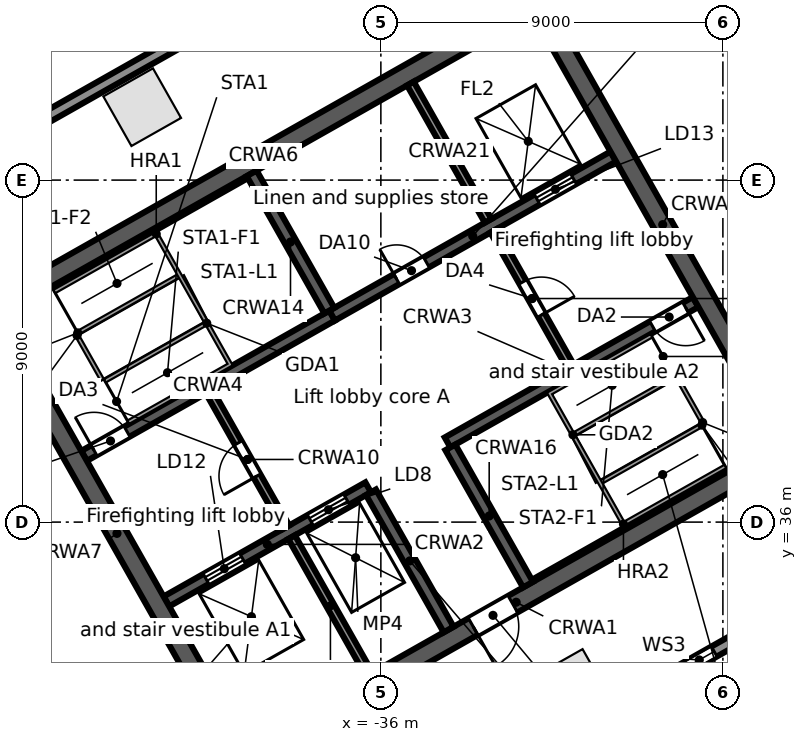
"""IFC4 building model, lengths in metres.
Left out: names, types, materials, properties, quantities, classifications, styles, units other than length and angle.
Written with IfcOpenShell. Run it as: python <this file> out.ifc"""

import sys

from ifc_helpers import new_model, si_unit, direction, frame, frame_2d, origin, origin_2d, place, context, subcontext, project, spatial, rectangle, extrude, element, fill, save


model = new_model("IFC4")
c1 = context("Model", 3, precision=1e-05, world=origin(), true_north=direction((0.0, 1.0)))
c2 = subcontext(c1, "Body", "Model", "MODEL_VIEW")
j1 = project(units=[si_unit("LENGTHUNIT", "METRE"), si_unit("PLANEANGLEUNIT", "RADIAN")], contexts=[c1])
p1 = place(None, origin())
s1 = spatial("IfcSite", under=j1, at=p1, CompositionType="ELEMENT")
p2 = place(p1, origin())
s2 = spatial("IfcBuilding", under=s1, at=p2, CompositionType="ELEMENT")
p3 = place(p2, frame((0.0, 0.0, 190.9)))
s3 = spatial("IfcBuildingStorey", under=s2, at=p3, CompositionType="ELEMENT", Elevation=190.9)
for number, where, z_axis, x_axis in (
    (1, (-42.28, 46.919, 0.0), (0.0, 0.0, 1.0), (-0.87, -0.492, 0.0)),
    (2, (-30.976, 31.635, 0.0), (0.0, 0.0, 1.0), (0.87, 0.492, 0.0)),
):
    element("IfcColumn", number, at=place(p3, frame(where, z_axis=z_axis, x_axis=x_axis)), inside=s3, PredefinedType="COLUMN", context=c2, shape_type="SweptSolid", body=[
        extrude(rectangle(XDim=1.5, YDim=1.5, at=origin_2d()), origin(), (0.0, 0.0, 1.0), 4.0),
    ])
p4 = place(p3, frame((-0.055, 47.969, 0.0), z_axis=(0.0, 0.0, 1.0), x_axis=(-0.870355730478, -0.492423499058, 0.0)))
e3 = element("IfcWall", 3, at=p4, inside=s3, PredefinedType="STANDARD", context=c2, shape_type="SweptSolid", body=[
    extrude(rectangle(XDim=43.75, YDim=0.3, at=frame_2d((21.875, 0.0))), origin(), (0.0, 0.0, 1.0), 3.68),
])
p5 = place(p4, frame((39.977, 0.0, 0.6)))
e4 = element("IfcOpeningElement", 4, at=p5, cuts=e3, PredefinedType="OPENING", context=c2, shape_type="SweptSolid", body=[
    extrude(rectangle(XDim=0.9, YDim=2.4, at=frame_2d((0.45, 1.2))), frame((0.0, 0.16, 0.0), z_axis=(0.0, -1.0, 0.0), x_axis=(1.0, 0.0, 0.0)), (0.0, 0.0, 1.0), 0.32),
])
p6 = place(p4, frame((37.338, 0.0, 0.0)))
e5 = element("IfcOpeningElement", 5, at=p6, cuts=e3, PredefinedType="OPENING", context=c2, shape_type="SweptSolid", body=[
    extrude(rectangle(XDim=1.8, YDim=2.4, at=frame_2d((0.9, 1.2))), frame((0.0, 0.16, 0.0), z_axis=(0.0, -1.0, 0.0), x_axis=(1.0, 0.0, 0.0)), (0.0, 0.0, 1.0), 0.32),
])
p7 = place(p4, frame((31.222, 0.0, 0.6)))
e6 = element("IfcOpeningElement", 6, at=p7, cuts=e3, PredefinedType="OPENING", context=c2, shape_type="SweptSolid", body=[
    extrude(rectangle(XDim=0.9, YDim=2.4, at=frame_2d((0.45, 1.2))), frame((0.0, 0.16, 0.0), z_axis=(0.0, -1.0, 0.0), x_axis=(1.0, 0.0, 0.0)), (0.0, 0.0, 1.0), 0.32),
])
p8 = place(p4, frame((28.584, 0.0, 0.0)))
e7 = element("IfcOpeningElement", 7, at=p8, cuts=e3, PredefinedType="OPENING", context=c2, shape_type="SweptSolid", body=[
    extrude(rectangle(XDim=1.8, YDim=2.4, at=frame_2d((0.9, 1.2))), frame((0.0, 0.16, 0.0), z_axis=(0.0, -1.0, 0.0), x_axis=(1.0, 0.0, 0.0)), (0.0, 0.0, 1.0), 0.32),
])
p9 = place(p4, frame((22.468, 0.0, 0.6)))
e8 = element("IfcOpeningElement", 8, at=p9, cuts=e3, PredefinedType="OPENING", context=c2, shape_type="SweptSolid", body=[
    extrude(rectangle(XDim=0.9, YDim=2.4, at=frame_2d((0.45, 1.2))), frame((0.0, 0.16, 0.0), z_axis=(0.0, -1.0, 0.0), x_axis=(1.0, 0.0, 0.0)), (0.0, 0.0, 1.0), 0.32),
])
p10 = place(p4, frame((19.829, 0.0, 0.0)))
e9 = element("IfcOpeningElement", 9, at=p10, cuts=e3, PredefinedType="OPENING", context=c2, shape_type="SweptSolid", body=[
    extrude(rectangle(XDim=1.8, YDim=2.4, at=frame_2d((0.9, 1.2))), frame((0.0, 0.16, 0.0), z_axis=(0.0, -1.0, 0.0), x_axis=(1.0, 0.0, 0.0)), (0.0, 0.0, 1.0), 0.32),
])
p11 = place(p4, frame((13.713, 0.0, 0.6)))
e10 = element("IfcOpeningElement", 10, at=p11, cuts=e3, PredefinedType="OPENING", context=c2, shape_type="SweptSolid", body=[
    extrude(rectangle(XDim=0.9, YDim=2.4, at=frame_2d((0.45, 1.2))), frame((0.0, 0.16, 0.0), z_axis=(0.0, -1.0, 0.0), x_axis=(1.0, 0.0, 0.0)), (0.0, 0.0, 1.0), 0.32),
])
p12 = place(p4, frame((11.075, 0.0, 0.0)))
e11 = element("IfcOpeningElement", 11, at=p12, cuts=e3, PredefinedType="OPENING", context=c2, shape_type="SweptSolid", body=[
    extrude(rectangle(XDim=1.8, YDim=2.4, at=frame_2d((0.9, 1.2))), frame((0.0, 0.16, 0.0), z_axis=(0.0, -1.0, 0.0), x_axis=(1.0, 0.0, 0.0)), (0.0, 0.0, 1.0), 0.32),
])
p13 = place(p4, frame((4.959, 0.0, 0.6)))
e12 = element("IfcOpeningElement", 12, at=p13, cuts=e3, PredefinedType="OPENING", context=c2, shape_type="SweptSolid", body=[
    extrude(rectangle(XDim=0.9, YDim=2.4, at=frame_2d((0.45, 1.2))), frame((0.0, 0.16, 0.0), z_axis=(0.0, -1.0, 0.0), x_axis=(1.0, 0.0, 0.0)), (0.0, 0.0, 1.0), 0.32),
])
p14 = place(p4, frame((2.32, 0.0, 0.0)))
e13 = element("IfcOpeningElement", 13, at=p14, cuts=e3, PredefinedType="OPENING", context=c2, shape_type="SweptSolid", body=[
    extrude(rectangle(XDim=1.8, YDim=2.4, at=frame_2d((0.9, 1.2))), frame((0.0, 0.16, 0.0), z_axis=(0.0, -1.0, 0.0), x_axis=(1.0, 0.0, 0.0)), (0.0, 0.0, 1.0), 0.32),
])
p15 = place(p3, frame((-58.745, 38.764, 0.0), z_axis=(0.0, 0.0, 1.0), x_axis=(0.870355811726, 0.492423355453, 0.0)))
e14 = element("IfcWall", 14, at=p15, inside=s3, PredefinedType="STANDARD", context=c2, shape_type="SweptSolid", body=[
    extrude(rectangle(XDim=64.025, YDim=0.3, at=frame_2d((32.013, 0.0))), origin(), (0.0, 0.0, 1.0), 3.68),
])
p16 = place(p15, frame((60.122, 0.0, 0.6)))
e15 = element("IfcOpeningElement", 15, at=p16, cuts=e14, PredefinedType="OPENING", context=c2, shape_type="SweptSolid", body=[
    extrude(rectangle(XDim=0.9, YDim=2.4, at=frame_2d((0.45, 1.2))), frame((0.0, 0.16, 0.0), z_axis=(0.0, -1.0, 0.0), x_axis=(1.0, 0.0, 0.0)), (0.0, 0.0, 1.0), 0.32),
])
p17 = place(p15, frame((50.992, 0.0, 0.6)))
e16 = element("IfcOpeningElement", 16, at=p17, cuts=e14, PredefinedType="OPENING", context=c2, shape_type="SweptSolid", body=[
    extrude(rectangle(XDim=0.9, YDim=2.4, at=frame_2d((0.45, 1.2))), frame((0.0, 0.16, 0.0), z_axis=(0.0, -1.0, 0.0), x_axis=(1.0, 0.0, 0.0)), (0.0, 0.0, 1.0), 0.32),
])
p18 = place(p15, frame((41.862, 0.0, 0.6)))
e17 = element("IfcOpeningElement", 17, at=p18, cuts=e14, PredefinedType="OPENING", context=c2, shape_type="SweptSolid", body=[
    extrude(rectangle(XDim=0.9, YDim=2.4, at=frame_2d((0.45, 1.2))), frame((0.0, 0.16, 0.0), z_axis=(0.0, -1.0, 0.0), x_axis=(1.0, 0.0, 0.0)), (0.0, 0.0, 1.0), 0.32),
])
p19 = place(p15, frame((32.732, 0.0, 0.6)))
e18 = element("IfcOpeningElement", 18, at=p19, cuts=e14, PredefinedType="OPENING", context=c2, shape_type="SweptSolid", body=[
    extrude(rectangle(XDim=0.9, YDim=2.4, at=frame_2d((0.45, 1.2))), frame((0.0, 0.16, 0.0), z_axis=(0.0, -1.0, 0.0), x_axis=(1.0, 0.0, 0.0)), (0.0, 0.0, 1.0), 0.32),
])
p20 = place(p15, frame((23.602, 0.0, 0.6)))
e19 = element("IfcOpeningElement", 19, at=p20, cuts=e14, PredefinedType="OPENING", context=c2, shape_type="SweptSolid", body=[
    extrude(rectangle(XDim=0.9, YDim=2.4, at=frame_2d((0.45, 1.2))), frame((0.0, 0.16, 0.0), z_axis=(0.0, -1.0, 0.0), x_axis=(1.0, 0.0, 0.0)), (0.0, 0.0, 1.0), 0.32),
])
p21 = place(p15, frame((14.472, 0.0, 0.6)))
e20 = element("IfcOpeningElement", 20, at=p21, cuts=e14, PredefinedType="OPENING", context=c2, shape_type="SweptSolid", body=[
    extrude(rectangle(XDim=0.9, YDim=2.4, at=frame_2d((0.45, 1.2))), frame((0.0, 0.16, 0.0), z_axis=(0.0, -1.0, 0.0), x_axis=(1.0, 0.0, 0.0)), (0.0, 0.0, 1.0), 0.32),
])
p22 = place(p15, frame((5.342, 0.0, 0.6)))
e21 = element("IfcOpeningElement", 21, at=p22, cuts=e14, PredefinedType="OPENING", context=c2, shape_type="SweptSolid", body=[
    extrude(rectangle(XDim=0.9, YDim=2.4, at=frame_2d((0.45, 1.2))), frame((0.0, 0.16, 0.0), z_axis=(0.0, -1.0, 0.0), x_axis=(1.0, 0.0, 0.0)), (0.0, 0.0, 1.0), 0.32),
])
p23 = place(p3, frame((-44.109, 26.504, 0.0), z_axis=(0.0, 0.0, 1.0), x_axis=(-0.857169502585, 0.515034410344, 0.0)))
e22 = element("IfcWall", 22, at=p23, inside=s3, PredefinedType="STANDARD", context=c2, shape_type="SweptSolid", body=[
    extrude(rectangle(XDim=17.127, YDim=0.3, at=frame_2d((8.563, 0.0))), origin(), (0.0, 0.0, 1.0), 3.68),
])
p24 = place(p23, frame((13.403, 0.0, 0.6)))
e23 = element("IfcOpeningElement", 23, at=p24, cuts=e22, PredefinedType="OPENING", context=c2, shape_type="SweptSolid", body=[
    extrude(rectangle(XDim=0.9, YDim=2.4, at=frame_2d((0.45, 1.2))), frame((0.0, 0.16, 0.0), z_axis=(0.0, -1.0, 0.0), x_axis=(1.0, 0.0, 0.0)), (0.0, 0.0, 1.0), 0.32),
])
p25 = place(p23, frame((4.903, 0.0, 0.6)))
e24 = element("IfcOpeningElement", 24, at=p25, cuts=e22, PredefinedType="OPENING", context=c2, shape_type="SweptSolid", body=[
    extrude(rectangle(XDim=0.9, YDim=2.4, at=frame_2d((0.45, 1.2))), frame((0.0, 0.16, 0.0), z_axis=(0.0, -1.0, 0.0), x_axis=(1.0, 0.0, 0.0)), (0.0, 0.0, 1.0), 0.32),
])
p26 = place(p3, frame((-39.838, 29.705, 0.0), z_axis=(0.0, 0.0, 1.0), x_axis=(0.870350116061, 0.492433422375, 0.0)))
e25 = element("IfcWall", 25, at=p26, inside=s3, PredefinedType="SOLIDWALL", context=c2, shape_type="SweptSolid", body=[
    extrude(rectangle(XDim=17.0, YDim=0.5, at=frame_2d((8.5, 0.0))), origin(), (0.0, 0.0, 1.0), 3.68),
])
p27 = place(p26, frame((7.2, 0.0, 0.0)))
e26 = element("IfcOpeningElement", 26, at=p27, cuts=e25, PredefinedType="OPENING", context=c2, shape_type="SweptSolid", body=[
    extrude(rectangle(XDim=1.2, YDim=2.1, at=frame_2d((0.6, 1.05))), frame((0.0, 0.26, 0.0), z_axis=(0.0, -1.0, 0.0), x_axis=(1.0, 0.0, 0.0)), (0.0, 0.0, 1.0), 0.52),
])
p28 = place(p3, frame((-41.643, 33.912, 0.0), z_axis=(0.0, 0.0, 1.0), x_axis=(0.870343599782, 0.492444939378, 0.0)))
e27 = element("IfcWall", 27, at=p28, inside=s3, PredefinedType="SOLIDWALL", context=c2, shape_type="SweptSolid", body=[
    extrude(rectangle(XDim=6.1, YDim=0.3, at=frame_2d((3.05, 0.0))), origin(), (0.0, 0.0, 1.0), 3.68),
])
p29 = place(p28, frame((1.2, 0.0, 0.0)))
e28 = element("IfcOpeningElement", 28, at=p29, cuts=e27, PredefinedType="OPENING", context=c2, shape_type="SweptSolid", body=[
    extrude(rectangle(XDim=1.1, YDim=2.1, at=frame_2d((0.55, 1.05))), frame((0.0, 0.16, 0.0), z_axis=(0.0, -1.0, 0.0), x_axis=(1.0, 0.0, 0.0)), (0.0, 0.0, 1.0), 0.32),
])
p30 = place(p28, frame((4.35, 0.0, 0.0)))
e29 = element("IfcOpeningElement", 29, at=p30, cuts=e27, PredefinedType="OPENING", context=c2, shape_type="SweptSolid", body=[
    extrude(rectangle(XDim=1.1, YDim=2.1, at=frame_2d((0.55, 1.05))), frame((0.0, 0.16, 0.0), z_axis=(0.0, -1.0, 0.0), x_axis=(1.0, 0.0, 0.0)), (0.0, 0.0, 1.0), 0.32),
])
p31 = place(p3, frame((-34.245, 38.097, 0.0), z_axis=(0.0, 0.0, 1.0), x_axis=(0.870364520461, 0.492407962489, 0.0)))
e30 = element("IfcWall", 30, at=p31, inside=s3, PredefinedType="SOLIDWALL", context=c2, shape_type="SweptSolid", body=[
    extrude(rectangle(XDim=7.5, YDim=0.3, at=frame_2d((3.75, 0.0))), origin(), (0.0, 0.0, 1.0), 3.68),
])
p32 = place(p31, frame((6.2, 0.0, 0.0)))
e31 = element("IfcOpeningElement", 31, at=p32, cuts=e30, PredefinedType="OPENING", context=c2, shape_type="SweptSolid", body=[
    extrude(rectangle(XDim=1.0, YDim=2.1, at=frame_2d((0.5, 1.05))), frame((0.0, 0.16, 0.0), z_axis=(0.0, -1.0, 0.0), x_axis=(1.0, 0.0, 0.0)), (0.0, 0.0, 1.0), 0.32),
])
p33 = place(p3, frame((-43.81, 37.741, 0.0), z_axis=(0.0, 0.0, 1.0), x_axis=(0.870350569555, 0.492432620848, 0.0)))
e32 = element("IfcWall", 32, at=p33, inside=s3, PredefinedType="SOLIDWALL", context=c2, shape_type="SweptSolid", body=[
    extrude(rectangle(XDim=7.5, YDim=0.3, at=frame_2d((3.75, 0.0))), origin(), (0.0, 0.0, 1.0), 3.68),
])
p34 = place(p33, frame((0.3, 0.0, 0.0)))
e33 = element("IfcOpeningElement", 33, at=p34, cuts=e32, PredefinedType="OPENING", context=c2, shape_type="SweptSolid", body=[
    extrude(rectangle(XDim=1.0, YDim=2.1, at=frame_2d((0.5, 1.05))), frame((0.0, 0.16, 0.0), z_axis=(0.0, -1.0, 0.0), x_axis=(1.0, 0.0, 0.0)), (0.0, 0.0, 1.0), 0.32),
])
p35 = place(p3, frame((-37.282, 41.435, 0.0), z_axis=(0.0, 0.0, 1.0), x_axis=(0.870356271124, 0.492422543467, 0.0)))
e34 = element("IfcWall", 34, at=p35, inside=s3, PredefinedType="SOLIDWALL", context=c2, shape_type="SweptSolid", body=[
    extrude(rectangle(XDim=8.5, YDim=0.3, at=frame_2d((4.25, 0.0))), origin(), (0.0, 0.0, 1.0), 3.68),
])
p36 = place(p35, frame((6.2, 0.0, 0.0)))
e35 = element("IfcOpeningElement", 35, at=p36, cuts=e34, PredefinedType="OPENING", context=c2, shape_type="SweptSolid", body=[
    extrude(rectangle(XDim=1.1, YDim=2.1, at=frame_2d((0.55, 1.05))), frame((0.0, 0.16, 0.0), z_axis=(0.0, -1.0, 0.0), x_axis=(1.0, 0.0, 0.0)), (0.0, 0.0, 1.0), 0.32),
])
p37 = place(p35, frame((1.95, 0.0, 0.0)))
e36 = element("IfcOpeningElement", 36, at=p37, cuts=e34, PredefinedType="OPENING", context=c2, shape_type="SweptSolid", body=[
    extrude(rectangle(XDim=0.9, YDim=2.1, at=frame_2d((0.45, 1.05))), frame((0.0, 0.16, 0.0), z_axis=(0.0, -1.0, 0.0), x_axis=(1.0, 0.0, 0.0)), (0.0, 0.0, 1.0), 0.32),
])
p38 = place(p3, frame((-46.486, 41.455, 0.0), z_axis=(0.0, 0.0, 1.0), x_axis=(0.870353598469, 0.492427267353, 0.0)))
e37 = element("IfcWall", 37, at=p38, inside=s3, PredefinedType="SOLIDWALL", context=c2, shape_type="SweptSolid", body=[
    extrude(rectangle(XDim=17.0, YDim=0.5, at=frame_2d((8.5, 0.0))), origin(), (0.0, 0.0, 1.0), 3.68),
])
p39 = place(p3, frame((-46.145, 41.361, 0.0), z_axis=(0.0, 0.0, 1.0), x_axis=(0.492435316254, -0.870349044525, 0.0)))
e38 = element("IfcWall", 38, at=p39, inside=s3, PredefinedType="SOLIDWALL", context=c2, shape_type="SweptSolid", body=[
    extrude(rectangle(XDim=13.0, YDim=0.5, at=frame_2d((6.5, 0.0))), origin(), (0.0, 0.0, 1.0), 3.68),
])
p40 = place(p3, frame((-38.349, 35.603, 0.0), z_axis=(0.0, 0.0, 1.0), x_axis=(0.492396453737, -0.870371031427, 0.0)))
e39 = element("IfcWall", 39, at=p40, inside=s3, PredefinedType="SOLIDWALL", context=c2, shape_type="SweptSolid", body=[
    extrude(rectangle(XDim=4.15, YDim=0.2, at=frame_2d((2.075, 0.0))), origin(), (0.0, 0.0, 1.0), 3.68),
])
p41 = place(p3, frame((-40.516, 39.433, 0.0), z_axis=(0.0, 0.0, 1.0), x_axis=(0.492453559952, -0.87033872216, 0.0)))
e40 = element("IfcWall", 40, at=p41, inside=s3, PredefinedType="PARTITIONING", context=c2, shape_type="SweptSolid", body=[
    extrude(rectangle(XDim=4.1, YDim=0.2, at=frame_2d((2.05, 0.0))), origin(), (0.0, 0.0, 1.0), 3.68),
])
p42 = place(p41, frame((1.55, 0.0, 0.0)))
e41 = element("IfcOpeningElement", 41, at=p42, cuts=e40, PredefinedType="OPENING", context=c2, shape_type="SweptSolid", body=[
    extrude(rectangle(XDim=1.0, YDim=2.1, at=frame_2d((0.5, 1.05))), frame((0.0, 0.11, 0.0), z_axis=(0.0, -1.0, 0.0), x_axis=(1.0, 0.0, 0.0)), (0.0, 0.0, 1.0), 0.22),
])
for number, where, z_axis, x_axis in (
    (42, (-36.26, 36.785, 0.0), (0.0, 0.0, 1.0), (0.492, -0.87, 0.0)),
    (43, (-39.399, 45.177, 0.0), (0.0, 0.0, 1.0), (0.492, -0.87, 0.0)),
    (44, (-34.171, 37.967, 0.0), (0.0, 0.0, 1.0), (0.492, -0.87, 0.0)),
):
    element("IfcWall", number, at=place(p3, frame(where, z_axis=z_axis, x_axis=x_axis)), inside=s3, PredefinedType="SOLIDWALL", context=c2, shape_type="SweptSolid", body=[
        extrude(rectangle(XDim=4.15, YDim=0.3, at=frame_2d((2.075, 0.0))), origin(), (0.0, 0.0, 1.0), 3.68),
    ])
p43 = place(p3, frame((-33.031, 43.667, 0.0), z_axis=(0.0, 0.0, 1.0), x_axis=(0.492408451753, -0.87036424366, 0.0)))
e45 = element("IfcWall", 45, at=p43, inside=s3, PredefinedType="PARTITIONING", context=c2, shape_type="SweptSolid", body=[
    extrude(rectangle(XDim=4.1, YDim=0.2, at=frame_2d((2.05, 0.0))), origin(), (0.0, 0.0, 1.0), 3.68),
])
p44 = place(p43, frame((1.55, 0.0, 0.0)))
e46 = element("IfcOpeningElement", 46, at=p44, cuts=e45, PredefinedType="OPENING", context=c2, shape_type="SweptSolid", body=[
    extrude(rectangle(XDim=1.0, YDim=2.1, at=frame_2d((0.5, 1.05))), frame((0.0, 0.11, 0.0), z_axis=(0.0, -1.0, 0.0), x_axis=(1.0, 0.0, 0.0)), (0.0, 0.0, 1.0), 0.22),
])
p45 = place(p3, frame((-35.222, 47.541, 0.0), z_axis=(0.0, 0.0, 1.0), x_axis=(0.492421666909, -0.870356767055, 0.0)))
e47 = element("IfcWall", 47, at=p45, inside=s3, PredefinedType="SOLIDWALL", context=c2, shape_type="SweptSolid", body=[
    extrude(rectangle(XDim=4.15, YDim=0.2, at=frame_2d((2.075, 0.0))), origin(), (0.0, 0.0, 1.0), 3.68),
])
p46 = place(p3, frame((-31.784, 49.486, 0.0), z_axis=(0.0, 0.0, 1.0), x_axis=(0.492435316254, -0.870349044525, 0.0)))
e48 = element("IfcWall", 48, at=p46, inside=s3, PredefinedType="SOLIDWALL", context=c2, shape_type="SweptSolid", body=[
    extrude(rectangle(XDim=13.0, YDim=0.5, at=frame_2d((6.5, 0.0))), origin(), (0.0, 0.0, 1.0), 3.68),
])
p47 = place(p7, origin())
e49 = element("IfcWindow", 49, at=p47, inside=s3, PartitioningType="SINGLE_PANEL", PredefinedType="WINDOW", context=c2, shape_type="SweptSolid", body=[
    extrude(rectangle(XDim=0.9, YDim=2.4, at=frame_2d((0.45, 1.2))), frame((0.0, 0.03, 0.0), z_axis=(0.0, -1.0, 0.0), x_axis=(1.0, 0.0, 0.0)), (0.0, 0.0, 1.0), 0.06),
])
fill(e6, e49)
p48 = place(p36, origin())
e50 = element("IfcDoor", 50, at=p48, inside=s3, OperationType="DOUBLE_DOOR_SLIDING", PredefinedType="DOOR", context=c2, shape_type="SweptSolid", body=[
    extrude(rectangle(XDim=1.1, YDim=2.1, at=frame_2d((0.55, 1.05))), frame((0.0, 0.025, 0.0), z_axis=(0.0, -1.0, 0.0), x_axis=(1.0, 0.0, 0.0)), (0.0, 0.0, 1.0), 0.05),
])
fill(e35, e50)
p49 = place(p29, origin())
e51 = element("IfcDoor", 51, at=p49, inside=s3, OperationType="DOUBLE_DOOR_SLIDING", PredefinedType="DOOR", context=c2, shape_type="SweptSolid", body=[
    extrude(rectangle(XDim=1.1, YDim=2.1, at=frame_2d((0.55, 1.05))), frame((0.0, 0.025, 0.0), z_axis=(0.0, -1.0, 0.0), x_axis=(1.0, 0.0, 0.0)), (0.0, 0.0, 1.0), 0.05),
])
fill(e28, e51)
p50 = place(p30, origin())
e52 = element("IfcDoor", 52, at=p50, inside=s3, OperationType="DOUBLE_DOOR_SLIDING", PredefinedType="DOOR", context=c2, shape_type="SweptSolid", body=[
    extrude(rectangle(XDim=1.1, YDim=2.1, at=frame_2d((0.55, 1.05))), frame((0.0, 0.025, 0.0), z_axis=(0.0, -1.0, 0.0), x_axis=(1.0, 0.0, 0.0)), (0.0, 0.0, 1.0), 0.05),
])
fill(e29, e52)
p51 = place(p34, origin())
e53 = element("IfcDoor", 53, at=p51, inside=s3, OperationType="SINGLE_SWING_LEFT", PredefinedType="DOOR", context=c2, shape_type="SweptSolid", body=[
    extrude(rectangle(XDim=1.0, YDim=2.1, at=frame_2d((0.5, 1.05))), frame((0.0, 0.025, 0.0), z_axis=(0.0, -1.0, 0.0), x_axis=(1.0, 0.0, 0.0)), (0.0, 0.0, 1.0), 0.05),
])
fill(e33, e53)
p52 = place(p32, frame((1.0, 0.0, 0.0), z_axis=(0.0, 0.0, 1.0), x_axis=(-1.0, 0.0, 0.0)))
e54 = element("IfcDoor", 54, at=p52, inside=s3, OperationType="SINGLE_SWING_LEFT", PredefinedType="DOOR", context=c2, shape_type="SweptSolid", body=[
    extrude(rectangle(XDim=1.0, YDim=2.1, at=frame_2d((0.5, 1.05))), frame((0.0, 0.025, 0.0), z_axis=(0.0, -1.0, 0.0), x_axis=(1.0, 0.0, 0.0)), (0.0, 0.0, 1.0), 0.05),
])
fill(e31, e54)
p53 = place(p42, frame((1.0, 0.0, 0.0), z_axis=(0.0, 0.0, 1.0), x_axis=(-1.0, 0.0, 0.0)))
e55 = element("IfcDoor", 55, at=p53, inside=s3, OperationType="SINGLE_SWING_LEFT", PredefinedType="DOOR", context=c2, shape_type="SweptSolid", body=[
    extrude(rectangle(XDim=1.0, YDim=2.1, at=frame_2d((0.5, 1.05))), frame((0.0, 0.025, 0.0), z_axis=(0.0, -1.0, 0.0), x_axis=(1.0, 0.0, 0.0)), (0.0, 0.0, 1.0), 0.05),
])
fill(e41, e55)
p54 = place(p44, origin())
e56 = element("IfcDoor", 56, at=p54, inside=s3, OperationType="SINGLE_SWING_RIGHT", PredefinedType="DOOR", context=c2, shape_type="SweptSolid", body=[
    extrude(rectangle(XDim=1.0, YDim=2.1, at=frame_2d((0.5, 1.05))), frame((0.0, 0.025, 0.0), z_axis=(0.0, -1.0, 0.0), x_axis=(1.0, 0.0, 0.0)), (0.0, 0.0, 1.0), 0.05),
])
fill(e46, e56)
p55 = place(p27, frame((1.2, 0.0, 0.0), z_axis=(0.0, 0.0, 1.0), x_axis=(-1.0, 0.0, 0.0)))
e57 = element("IfcDoor", 57, at=p55, inside=s3, OperationType="SINGLE_SWING_RIGHT", PredefinedType="DOOR", context=c2, shape_type="SweptSolid", body=[
    extrude(rectangle(XDim=1.2, YDim=2.1, at=frame_2d((0.6, 1.05))), frame((0.0, 0.025, 0.0), z_axis=(0.0, -1.0, 0.0), x_axis=(1.0, 0.0, 0.0)), (0.0, 0.0, 1.0), 0.05),
])
fill(e26, e57)
p56 = place(p37, origin())
e58 = element("IfcDoor", 58, at=p56, inside=s3, OperationType="SINGLE_SWING_LEFT", PredefinedType="DOOR", context=c2, shape_type="SweptSolid", body=[
    extrude(rectangle(XDim=0.9, YDim=2.1, at=frame_2d((0.45, 1.05))), frame((0.0, 0.025, 0.0), z_axis=(0.0, -1.0, 0.0), x_axis=(1.0, 0.0, 0.0)), (0.0, 0.0, 1.0), 0.05),
])
fill(e36, e58)
save(model, sys.argv[1])
